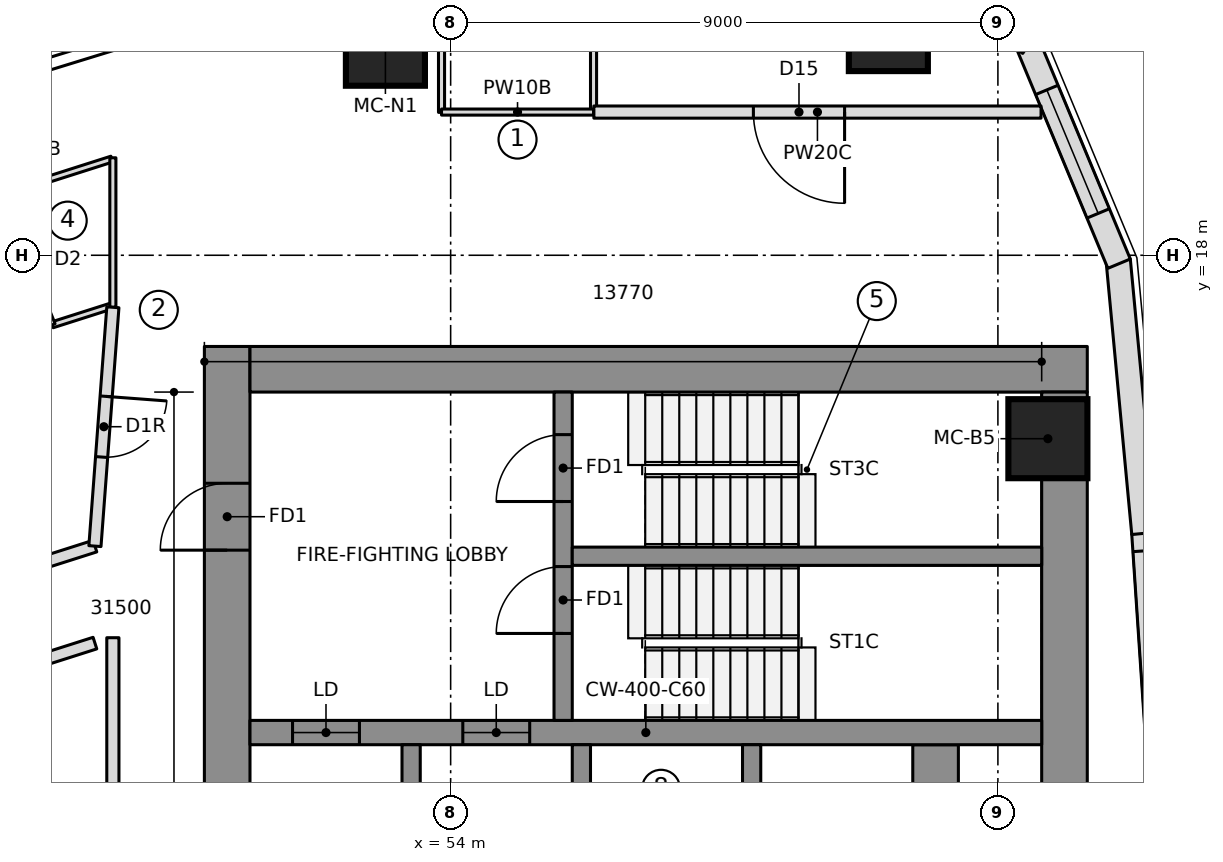
"""IFC4 building model, lengths in metres.
Left out: names, types, materials, properties, quantities, classifications, styles, units other than length and angle.
Written with IfcOpenShell. Run it as: python <this file> out.ifc"""

import sys

from ifc_helpers import new_model, si_unit, direction, frame, frame_2d, origin, origin_2d, place, context, subcontext, project, spatial, polyline, rectangle, outline, extrude, element, fill, save


model = new_model("IFC4")
c1 = context("Model", 3, precision=1e-05, world=origin(), true_north=direction((0.0, 1.0)))
c2 = subcontext(c1, "Body", "Model", "MODEL_VIEW")
j1 = project(units=[si_unit("LENGTHUNIT", "METRE"), si_unit("PLANEANGLEUNIT", "RADIAN")], contexts=[c1])
p1 = place(None, origin())
s1 = spatial("IfcSite", under=j1, at=p1, CompositionType="ELEMENT")
p2 = place(p1, origin())
s2 = spatial("IfcBuilding", under=s1, at=p2, CompositionType="ELEMENT")
p3 = place(p2, frame((0.0, 0.0, 203.9)))
s3 = spatial("IfcBuildingStorey", under=s2, at=p3, CompositionType="ELEMENT", Elevation=203.9)
p4 = place(p3, frame((50.325, 6.65, 0.0), z_axis=(0.0, 0.0, 1.0), x_axis=(0.0, 1.0, 0.0)))
e1 = element("IfcWall", 1, at=p4, inside=s3, PredefinedType="SHEAR", context=c2, shape_type="SweptSolid", body=[
    extrude(rectangle(XDim=9.85, YDim=0.75, at=frame_2d((4.925, 0.0))), origin(), (0.0, 0.0, 1.0), 3.55),
])
p5 = place(p4, frame((6.5, 0.0, 0.0)))
e2 = element("IfcOpeningElement", 2, at=p5, cuts=e1, PredefinedType="OPENING", context=c2, shape_type="SweptSolid", body=[
    extrude(rectangle(XDim=1.1, YDim=2.1, at=frame_2d((0.55, 1.05))), frame((0.0, 0.385, 0.0), z_axis=(0.0, -1.0, 0.0), x_axis=(1.0, 0.0, 0.0)), (0.0, 0.0, 1.0), 0.77),
])
p6 = place(p3, frame((50.7, 16.125, 0.0), z_axis=(0.0, 0.0, 1.0), x_axis=(1.0, 0.0, 0.0)))
e3 = element("IfcWall", 3, at=p6, inside=s3, PredefinedType="SHEAR", context=c2, shape_type="SweptSolid", body=[
    extrude(rectangle(XDim=13.77, YDim=0.75, at=frame_2d((6.885, 0.0))), origin(), (0.0, 0.0, 1.0), 3.55),
])
p7 = place(p3, frame((64.095, 8.099, 0.0), z_axis=(0.0, 0.0, 1.0), x_axis=(0.0, 1.0, 0.0)))
e4 = element("IfcWall", 4, at=p7, inside=s3, PredefinedType="SHEAR", context=c2, shape_type="SweptSolid", body=[
    extrude(rectangle(XDim=7.651, YDim=0.75, at=frame_2d((3.825, 0.0))), origin(), (0.0, 0.0, 1.0), 3.55),
])
p8 = place(p3, frame((61.975, -9.95, 0.0), z_axis=(0.0, 0.0, 1.0), x_axis=(0.0, 1.0, 0.0)))
e5 = element("IfcWall", 5, at=p8, inside=s3, PredefinedType="SHEAR", context=c2, shape_type="SweptSolid", body=[
    extrude(rectangle(XDim=19.9, YDim=0.75, at=frame_2d((9.95, 0.0))), origin(), (0.0, 0.0, 1.0), 3.55),
])
p9 = place(p3, frame((50.7, 10.15, 0.0), z_axis=(0.0, 0.0, 1.0), x_axis=(1.0, 0.0, 0.0)))
e6 = element("IfcWall", 6, at=p9, inside=s3, PredefinedType="SHEAR", context=c2, shape_type="SweptSolid", body=[
    extrude(rectangle(XDim=13.02, YDim=0.4, at=frame_2d((6.51, 0.0))), origin(), (0.0, 0.0, 1.0), 3.55),
])
p10 = place(p9, frame((0.7, 0.0, 0.0)))
e7 = element("IfcOpeningElement", 7, at=p10, cuts=e6, PredefinedType="OPENING", context=c2, shape_type="SweptSolid", body=[
    extrude(rectangle(XDim=1.1, YDim=2.1, at=frame_2d((0.55, 1.05))), frame((0.0, 0.21, 0.0), z_axis=(0.0, -1.0, 0.0), x_axis=(1.0, 0.0, 0.0)), (0.0, 0.0, 1.0), 0.42),
])
p11 = place(p9, frame((3.5, 0.0, 0.0)))
e8 = element("IfcOpeningElement", 8, at=p11, cuts=e6, PredefinedType="OPENING", context=c2, shape_type="SweptSolid", body=[
    extrude(rectangle(XDim=1.1, YDim=2.1, at=frame_2d((0.55, 1.05))), frame((0.0, 0.21, 0.0), z_axis=(0.0, -1.0, 0.0), x_axis=(1.0, 0.0, 0.0)), (0.0, 0.0, 1.0), 0.42),
])
for number, where, z_axis, x_axis in (
    (9, (53.35, 6.95, 0.0), (0.0, 0.0, 1.0), (0.0, 1.0, 0.0)),
    (10, (56.15, 6.95, 0.0), (0.0, 0.0, 1.0), (0.0, 1.0, 0.0)),
    (11, (58.95, 6.95, 0.0), (0.0, 0.0, 1.0), (0.0, 1.0, 0.0)),
):
    element("IfcWall", number, at=place(p3, frame(where, z_axis=z_axis, x_axis=x_axis)), inside=s3, PredefinedType="SHEAR", context=c2, shape_type="SweptSolid", body=[
        extrude(rectangle(XDim=3.0, YDim=0.3, at=frame_2d((1.5, 0.0))), origin(), (0.0, 0.0, 1.0), 3.55),
    ])
p12 = place(p3, frame((55.85, 10.35, 0.0), z_axis=(0.0, 0.0, 1.0), x_axis=(0.0, 1.0, 0.0)))
e12 = element("IfcWall", 12, at=p12, inside=s3, PredefinedType="SHEAR", context=c2, shape_type="SweptSolid", body=[
    extrude(rectangle(XDim=5.4, YDim=0.3, at=frame_2d((2.7, 0.0))), origin(), (0.0, 0.0, 1.0), 3.55),
])
p13 = place(p12, frame((1.43, 0.0, 0.0)))
e13 = element("IfcOpeningElement", 13, at=p13, cuts=e12, PredefinedType="OPENING", context=c2, shape_type="SweptSolid", body=[
    extrude(rectangle(XDim=1.1, YDim=2.1, at=frame_2d((0.55, 1.05))), frame((0.0, 0.16, 0.0), z_axis=(0.0, -1.0, 0.0), x_axis=(1.0, 0.0, 0.0)), (0.0, 0.0, 1.0), 0.32),
])
p14 = place(p12, frame((3.6, 0.0, 0.0)))
e14 = element("IfcOpeningElement", 14, at=p14, cuts=e12, PredefinedType="OPENING", context=c2, shape_type="SweptSolid", body=[
    extrude(rectangle(XDim=1.1, YDim=2.1, at=frame_2d((0.55, 1.05))), frame((0.0, 0.16, 0.0), z_axis=(0.0, -1.0, 0.0), x_axis=(1.0, 0.0, 0.0)), (0.0, 0.0, 1.0), 0.32),
])
p15 = place(p3, frame((56.0, 13.05, 0.0), z_axis=(0.0, 0.0, 1.0), x_axis=(1.0, 0.0, 0.0)))
e15 = element("IfcWall", 15, at=p15, inside=s3, PredefinedType="SHEAR", context=c2, shape_type="SweptSolid", body=[
    extrude(rectangle(XDim=7.72, YDim=0.3, at=frame_2d((3.86, 0.0))), origin(), (0.0, 0.0, 1.0), 3.55),
])
for number, where, z_axis, x_axis in (
    (16, (63.822, 14.983, 0.0), (0.0, 0.0, 1.0), (1.0, 0.0, 0.0)),
    (17, (61.198, 21.679, 0.0), (0.0, 0.0, 1.0), (1.0, 0.0, 0.0)),
    (18, (52.927, 21.438, 0.0), (0.0, 0.0, 1.0), (1.0, 0.0, 0.0)),
):
    element("IfcColumn", number, at=place(p3, frame(where, z_axis=z_axis, x_axis=x_axis)), inside=s3, PredefinedType="COLUMN", context=c2, shape_type="SweptSolid", body=[
        extrude(rectangle(XDim=1.3, YDim=1.3, at=origin_2d()), origin(), (0.0, 0.0, 1.0), 3.55),
    ])
p16 = place(p3, frame((65.7, 8.958, 0.0), z_axis=(0.0, 0.0, 1.0), x_axis=(-0.066905935948, 0.997759287471, 0.0)))
e19 = element("IfcWall", 19, at=p16, inside=s3, PredefinedType="NOTDEFINED", context=c2, shape_type="SweptSolid", body=[
    extrude(outline(polyline([(-0.003, -0.2), (4.484, -0.2), (4.478, 0.2), (0.003, 0.2), (-0.003, -0.2)])), origin(), (0.0, 0.0, 1.0), 3.25),
])
p17 = place(p16, frame((0.29, 0.0, 0.9)))
e20 = element("IfcOpeningElement", 20, at=p17, cuts=e19, PredefinedType="OPENING", context=c2, shape_type="SweptSolid", body=[
    extrude(rectangle(XDim=3.9, YDim=1.8, at=frame_2d((1.95, 0.9))), frame((0.0, 0.21, 0.0), z_axis=(0.0, -1.0, 0.0), x_axis=(1.0, 0.0, 0.0)), (0.0, 0.0, 1.0), 0.42),
])
p18 = place(p3, frame((65.401, 13.429, 0.0), z_axis=(0.0, 0.0, 1.0), x_axis=(-0.093605694738, 0.995609348044, 0.0)))
e21 = element("IfcWall", 21, at=p18, inside=s3, PredefinedType="NOTDEFINED", context=c2, shape_type="SweptSolid", body=[
    extrude(outline(polyline([(-0.003, -0.2), (4.511, -0.2), (4.451, 0.2), (0.003, 0.2), (-0.003, -0.2)])), origin(), (0.0, 0.0, 1.0), 3.25),
])
p19 = place(p3, frame((64.981, 17.89, 0.0), z_axis=(0.0, 0.0, 1.0), x_axis=(-0.383997619794, 0.923334082547, 0.0)))
e22 = element("IfcWall", 22, at=p19, inside=s3, PredefinedType="NOTDEFINED", context=c2, shape_type="SweptSolid", body=[
    extrude(outline(polyline([(-0.03, -0.2), (3.988, -0.2), (3.87, 0.2), (0.03, 0.2), (-0.03, -0.2)])), origin(), (0.0, 0.0, 1.0), 3.25),
])
p20 = place(p19, frame((0.865, 0.0, 0.6)))
e23 = element("IfcOpeningElement", 23, at=p20, cuts=e22, PredefinedType="OPENING", context=c2, shape_type="SweptSolid", body=[
    extrude(outline(polyline([(0.0, 1.35), (0.084, 1.771), (0.322, 2.128), (0.679, 2.366), (1.1, 2.45), (1.521, 2.366), (1.878, 2.128), (2.116, 1.771), (2.2, 1.35), (2.2, 1.1), (2.116, 0.679), (1.878, 0.322), (1.521, 0.084), (1.1, 0.0), (0.679, 0.084), (0.322, 0.322), (0.084, 0.679), (0.0, 1.1), (0.0, 1.35)])), frame((0.0, 0.21, 0.0), z_axis=(0.0, -1.0, 0.0), x_axis=(1.0, 0.0, 0.0)), (0.0, 0.0, 1.0), 0.42),
])
for number, where, z_axis, x_axis in (
    (24, (56.35, 22.65, 0.0), (0.0, 0.0, 1.0), (0.0, -1.0, 0.0)),
    (25, (53.85, 20.35, 0.0), (0.0, 0.0, 1.0), (0.0, 1.0, 0.0)),
):
    element("IfcWall", number, at=place(p3, frame(where, z_axis=z_axis, x_axis=x_axis)), inside=s3, PredefinedType="PARTITIONING", context=c2, shape_type="SweptSolid", body=[
        extrude(rectangle(XDim=2.3, YDim=0.1, at=frame_2d((1.15, 0.0))), origin(), (0.0, 0.0, 1.0), 3.25),
    ])
p21 = place(p3, frame((46.586, 18.994, 0.0), z_axis=(0.0, 0.0, 1.0), x_axis=(0.952696570315, 0.303923090451, 0.0)))
e26 = element("IfcWall", 26, at=p21, inside=s3, PredefinedType="PARTITIONING", context=c2, shape_type="SweptSolid", body=[
    extrude(rectangle(XDim=1.933, YDim=0.1, at=frame_2d((0.966, 0.0))), origin(), (0.0, 0.0, 1.0), 3.25),
])
p22 = place(p3, frame((48.427, 17.167, 0.0), z_axis=(0.0, 0.0, 1.0), x_axis=(-0.952763220029, -0.303714086864, 0.0)))
e27 = element("IfcWall", 27, at=p22, inside=s3, PredefinedType="PARTITIONING", context=c2, shape_type="SweptSolid", body=[
    extrude(rectangle(XDim=1.027, YDim=0.1, at=frame_2d((0.513, 0.0))), origin(), (0.0, 0.0, 1.0), 3.25),
])
p23 = place(p3, frame((47.448, 16.855, 0.0), z_axis=(0.0, 0.0, 1.0), x_axis=(-0.373817051068, 0.927502459474, 0.0)))
e28 = element("IfcWall", 28, at=p23, inside=s3, PredefinedType="PARTITIONING", context=c2, shape_type="SweptSolid", body=[
    extrude(rectangle(XDim=2.306, YDim=0.1, at=frame_2d((1.153, 0.0))), origin(), (0.0, 0.0, 1.0), 3.25),
])
p24 = place(p23, frame((0.75, 0.0, 0.0)))
e29 = element("IfcOpeningElement", 29, at=p24, cuts=e28, PredefinedType="OPENING", context=c2, shape_type="SweptSolid", body=[
    extrude(rectangle(XDim=0.8, YDim=2.1, at=frame_2d((0.4, 1.05))), frame((0.0, 0.06, 0.0), z_axis=(0.0, -1.0, 0.0), x_axis=(1.0, 0.0, 0.0)), (0.0, 0.0, 1.0), 0.12),
])
p25 = place(p3, frame((63.709, 20.355, 0.0), z_axis=(0.0, 0.0, 1.0), x_axis=(-1.0, 0.0, 0.0)))
e30 = element("IfcWall", 30, at=p25, inside=s3, PredefinedType="PARTITIONING", context=c2, shape_type="SweptSolid", body=[
    extrude(rectangle(XDim=7.354, YDim=0.2, at=frame_2d((3.677, 0.0))), origin(), (0.0, 0.0, 1.0), 3.25),
])
p26 = place(p25, frame((3.231, 0.0, 0.0)))
e31 = element("IfcOpeningElement", 31, at=p26, cuts=e30, PredefinedType="OPENING", context=c2, shape_type="SweptSolid", body=[
    extrude(rectangle(XDim=1.5, YDim=2.1, at=frame_2d((0.75, 1.05))), frame((0.0, 0.11, 0.0), z_axis=(0.0, -1.0, 0.0), x_axis=(1.0, 0.0, 0.0)), (0.0, 0.0, 1.0), 0.22),
])
p27 = place(p3, frame((56.35, 20.355, 0.0), z_axis=(0.0, 0.0, 1.0), x_axis=(-1.0, 0.0, 0.0)))
e32 = element("IfcWall", 32, at=p27, inside=s3, PredefinedType="PARTITIONING", context=c2, shape_type="SweptSolid", body=[
    extrude(rectangle(XDim=2.5, YDim=0.1, at=frame_2d((1.25, 0.0))), origin(), (0.0, 0.0, 1.0), 3.25),
])
p28 = place(p3, frame((48.445, 19.603, 0.0), z_axis=(0.0, 0.0, 1.0), x_axis=(0.0, -1.0, 0.0)))
e33 = element("IfcWall", 33, at=p28, inside=s3, PredefinedType="PARTITIONING", context=c2, shape_type="SweptSolid", body=[
    extrude(rectangle(XDim=2.459, YDim=0.1, at=frame_2d((1.229, 0.0))), origin(), (0.0, 0.0, 1.0), 3.25),
])
p29 = place(p3, frame((48.15, 13.217, 0.0), z_axis=(0.0, 0.0, 1.0), x_axis=(-0.952731090451, -0.303814860215, 0.0)))
e34 = element("IfcWall", 34, at=p29, inside=s3, PredefinedType="PARTITIONING", context=c2, shape_type="SweptSolid", body=[
    extrude(rectangle(XDim=1.088, YDim=0.2, at=frame_2d((0.544, 0.0))), origin(), (0.0, 0.0, 1.0), 3.25),
])
p30 = place(p3, frame((46.881, 11.217, 0.0), z_axis=(0.0, 0.0, 1.0), x_axis=(0.952761948983, 0.303718074157, 0.0)))
e35 = element("IfcWall", 35, at=p30, inside=s3, PredefinedType="PARTITIONING", context=c2, shape_type="SweptSolid", body=[
    extrude(rectangle(XDim=1.332, YDim=0.2, at=frame_2d((0.666, 0.0))), origin(), (0.0, 0.0, 1.0), 3.25),
])
p31 = place(p3, frame((48.445, 17.145, 0.0), z_axis=(0.0, 0.0, 1.0), x_axis=(-0.074933243819, -0.997188552366, 0.0)))
e36 = element("IfcWall", 36, at=p31, inside=s3, PredefinedType="PARTITIONING", context=c2, shape_type="SweptSolid", body=[
    extrude(rectangle(XDim=3.939, YDim=0.2, at=frame_2d((1.969, 0.0))), origin(), (0.0, 0.0, 1.0), 3.25),
])
p32 = place(p31, frame((1.47, 0.0, 0.0)))
e37 = element("IfcOpeningElement", 37, at=p32, cuts=e36, PredefinedType="OPENING", context=c2, shape_type="SweptSolid", body=[
    extrude(rectangle(XDim=1.0, YDim=2.1, at=frame_2d((0.5, 1.05))), frame((0.0, 0.11, 0.0), z_axis=(0.0, -1.0, 0.0), x_axis=(1.0, 0.0, 0.0)), (0.0, 0.0, 1.0), 0.22),
])
p33 = place(p3, frame((48.445, 11.71, 0.0), z_axis=(0.0, 0.0, 1.0), x_axis=(0.0, -1.0, 0.0)))
e38 = element("IfcWall", 38, at=p33, inside=s3, PredefinedType="PARTITIONING", context=c2, shape_type="SweptSolid", body=[
    extrude(rectangle(XDim=23.42, YDim=0.2, at=frame_2d((11.71, 0.0))), origin(), (0.0, 0.0, 1.0), 3.25),
])
p34 = place(p17, origin())
e39 = element("IfcWindow", 39, at=p34, inside=s3, PartitioningType="SINGLE_PANEL", PredefinedType="WINDOW", context=c2, shape_type="SweptSolid", body=[
    extrude(rectangle(XDim=3.9, YDim=1.8, at=frame_2d((1.95, 0.9))), frame((0.0, 0.17, 0.0), z_axis=(0.0, -1.0, 0.0), x_axis=(1.0, 0.0, 0.0)), (0.0, 0.0, 1.0), 0.06),
])
fill(e20, e39)
p35 = place(p20, origin())
e40 = element("IfcWindow", 40, at=p35, inside=s3, PartitioningType="SINGLE_PANEL", PredefinedType="WINDOW", context=c2, shape_type="SweptSolid", body=[
    extrude(outline(polyline([(0.0, 1.35), (0.084, 1.771), (0.322, 2.128), (0.679, 2.366), (1.1, 2.45), (1.521, 2.366), (1.878, 2.128), (2.116, 1.771), (2.2, 1.35), (2.2, 1.1), (2.116, 0.679), (1.878, 0.322), (1.521, 0.084), (1.1, 0.0), (0.679, 0.084), (0.322, 0.322), (0.084, 0.679), (0.0, 1.1), (0.0, 1.35)])), frame((0.0, 0.17, 0.0), z_axis=(0.0, -1.0, 0.0), x_axis=(1.0, 0.0, 0.0)), (0.0, 0.0, 1.0), 0.06),
])
fill(e23, e40)
p36 = place(p26, origin())
e41 = element("IfcDoor", 41, at=p36, inside=s3, OperationType="DOUBLE_DOOR_SINGLE_SWING", PredefinedType="DOOR", context=c2, shape_type="SweptSolid", body=[
    extrude(rectangle(XDim=1.5, YDim=2.1, at=frame_2d((0.75, 1.05))), frame((0.0, 0.025, 0.0), z_axis=(0.0, -1.0, 0.0), x_axis=(1.0, 0.0, 0.0)), (0.0, 0.0, 1.0), 0.05),
])
fill(e31, e41)
p37 = place(p32, origin())
e42 = element("IfcDoor", 42, at=p37, inside=s3, OperationType="SINGLE_SWING_RIGHT", PredefinedType="DOOR", context=c2, shape_type="SweptSolid", body=[
    extrude(rectangle(XDim=1.0, YDim=2.1, at=frame_2d((0.5, 1.05))), frame((0.0, 0.025, 0.0), z_axis=(0.0, -1.0, 0.0), x_axis=(1.0, 0.0, 0.0)), (0.0, 0.0, 1.0), 0.05),
])
fill(e37, e42)
p38 = place(p10, origin())
e43 = element("IfcDoor", 43, at=p38, inside=s3, OperationType="DOUBLE_DOOR_SLIDING", PredefinedType="DOOR", context=c2, shape_type="SweptSolid", body=[
    extrude(rectangle(XDim=1.1, YDim=2.1, at=frame_2d((0.55, 1.05))), frame((0.0, 0.025, 0.0), z_axis=(0.0, -1.0, 0.0), x_axis=(1.0, 0.0, 0.0)), (0.0, 0.0, 1.0), 0.05),
])
fill(e7, e43)
p39 = place(p11, origin())
e44 = element("IfcDoor", 44, at=p39, inside=s3, OperationType="DOUBLE_DOOR_SLIDING", PredefinedType="DOOR", context=c2, shape_type="SweptSolid", body=[
    extrude(rectangle(XDim=1.1, YDim=2.1, at=frame_2d((0.55, 1.05))), frame((0.0, 0.025, 0.0), z_axis=(0.0, -1.0, 0.0), x_axis=(1.0, 0.0, 0.0)), (0.0, 0.0, 1.0), 0.05),
])
fill(e8, e44)
p40 = place(p13, origin())
e45 = element("IfcDoor", 45, at=p40, inside=s3, OperationType="SINGLE_SWING_RIGHT", PredefinedType="DOOR", context=c2, shape_type="SweptSolid", body=[
    extrude(rectangle(XDim=1.1, YDim=2.1, at=frame_2d((0.55, 1.05))), frame((0.0, 0.025, 0.0), z_axis=(0.0, -1.0, 0.0), x_axis=(1.0, 0.0, 0.0)), (0.0, 0.0, 1.0), 0.05),
])
fill(e13, e45)
p41 = place(p14, origin())
e46 = element("IfcDoor", 46, at=p41, inside=s3, OperationType="SINGLE_SWING_RIGHT", PredefinedType="DOOR", context=c2, shape_type="SweptSolid", body=[
    extrude(rectangle(XDim=1.1, YDim=2.1, at=frame_2d((0.55, 1.05))), frame((0.0, 0.025, 0.0), z_axis=(0.0, -1.0, 0.0), x_axis=(1.0, 0.0, 0.0)), (0.0, 0.0, 1.0), 0.05),
])
fill(e14, e46)
p42 = place(p5, origin())
e47 = element("IfcDoor", 47, at=p42, inside=s3, OperationType="SINGLE_SWING_RIGHT", PredefinedType="DOOR", context=c2, shape_type="SweptSolid", body=[
    extrude(rectangle(XDim=1.1, YDim=2.1, at=frame_2d((0.55, 1.05))), frame((0.0, 0.025, 0.0), z_axis=(0.0, -1.0, 0.0), x_axis=(1.0, 0.0, 0.0)), (0.0, 0.0, 1.0), 0.05),
])
fill(e2, e47)
save(model, sys.argv[1])
